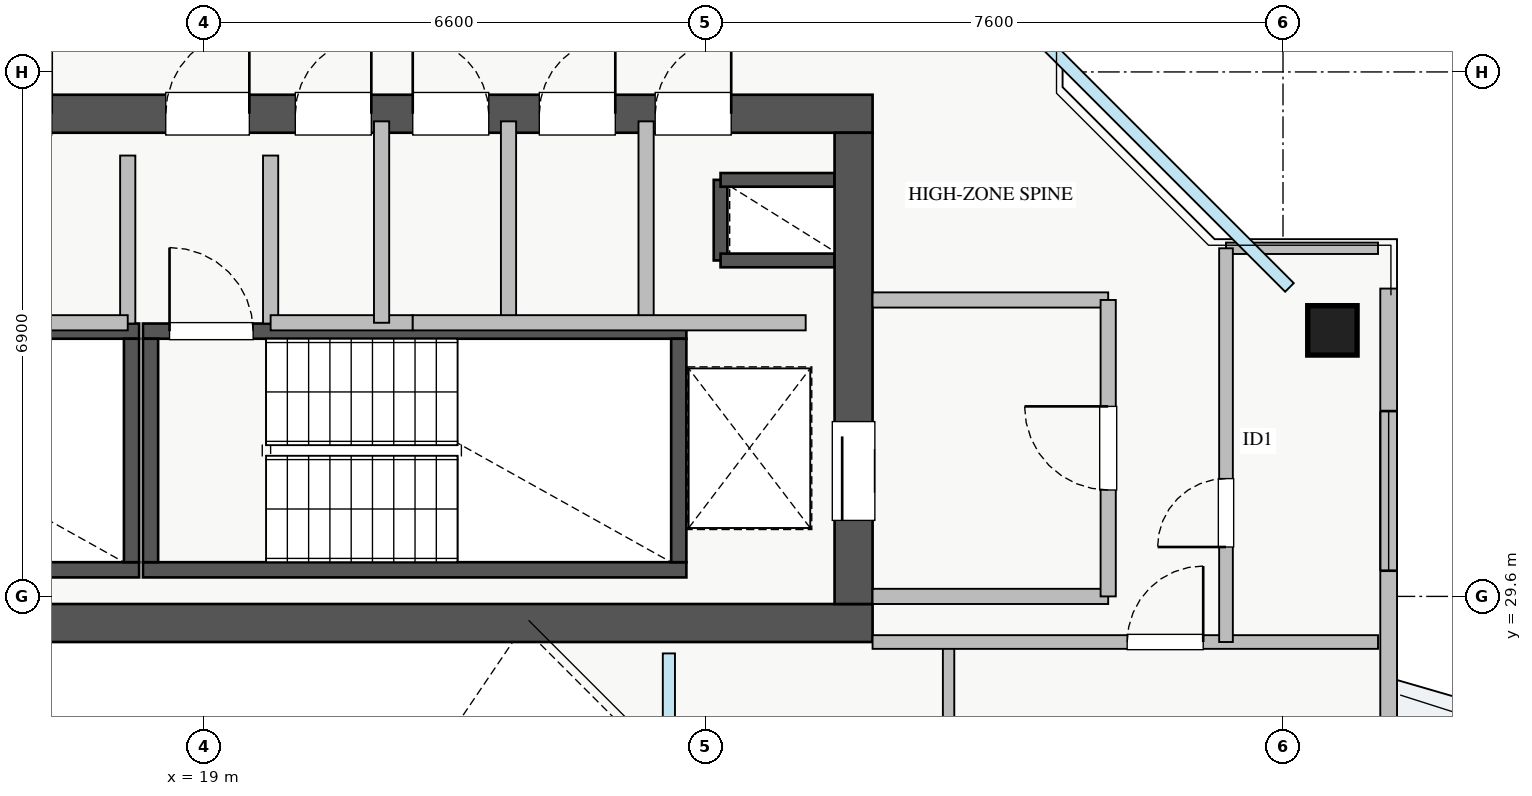
"""IFC4 building model, lengths in metres.
Left out: names, types, materials, properties, quantities, classifications, styles, units other than length and angle.
Written with IfcOpenShell. Run it as: python <this file> out.ifc"""

import sys

from ifc_helpers import new_model, si_unit, direction, frame, frame_2d, origin, origin_2d, place, context, subcontext, project, spatial, rectangle, extrude, source, transform, mapped, element, fill, save


model = new_model("IFC4")
c1 = context("Model", 3, precision=1e-05, world=origin(), true_north=direction((0.0, 1.0)))
c2 = subcontext(c1, "Body", "Model", "MODEL_VIEW")
j1 = project(units=[si_unit("LENGTHUNIT", "METRE"), si_unit("PLANEANGLEUNIT", "RADIAN")], contexts=[c1])
p1 = place(None, origin())
s1 = spatial("IfcSite", under=j1, at=p1, CompositionType="ELEMENT")
p2 = place(p1, origin())
s2 = spatial("IfcBuilding", under=s1, at=p2, CompositionType="ELEMENT")
p3 = place(p2, frame((0.0, 0.0, 243.75)))
s3 = spatial("IfcBuildingStorey", under=s2, at=p3, CompositionType="ELEMENT", Elevation=243.75)
p4 = place(p3, frame((25.8, 34.02, 0.0), z_axis=(0.0, 0.0, 1.0), x_axis=(0.0, 1.0, 0.0)))
e1 = element("IfcWall", 1, at=p4, inside=s3, PredefinedType="SHEAR", context=c2, shape_type="SweptSolid", body=[
    extrude(rectangle(XDim=1.06, YDim=0.18, at=frame_2d((0.53, 0.0))), origin(), (0.0, 0.0, 1.0), 3.07),
])
for number, where, z_axis, x_axis in (
    (2, (25.8, 35.08, 0.0), (0.0, 0.0, 1.0), (1.0, 0.0, 0.0)),
    (3, (25.8, 34.02, 0.0), (0.0, 0.0, 1.0), (1.0, 0.0, 0.0)),
):
    element("IfcWall", number, at=place(p3, frame(where, z_axis=z_axis, x_axis=x_axis)), inside=s3, PredefinedType="SHEAR", context=c2, shape_type="SweptSolid", body=[
        extrude(rectangle(XDim=1.5, YDim=0.18, at=frame_2d((0.75, 0.0))), origin(), (0.0, 0.0, 1.0), 3.07),
    ])
p5 = place(p3, frame((10.7, 29.95, 0.0), z_axis=(0.0, 0.0, 1.0), x_axis=(1.0, 0.0, 0.0)))
e4 = element("IfcWall", 4, at=p5, inside=s3, PredefinedType="SHEAR", context=c2, shape_type="SweptSolid", body=[
    extrude(rectangle(XDim=7.45, YDim=0.2, at=frame_2d((3.725, 0.0))), origin(), (0.0, 0.0, 1.0), 3.25),
])
p6 = place(p3, frame((10.7, 33.09, 0.0), z_axis=(0.0, 0.0, 1.0), x_axis=(1.0, 0.0, 0.0)))
e5 = element("IfcWall", 5, at=p6, inside=s3, PredefinedType="SHEAR", context=c2, shape_type="SweptSolid", body=[
    extrude(rectangle(XDim=7.45, YDim=0.2, at=frame_2d((3.725, 0.0))), origin(), (0.0, 0.0, 1.0), 3.25),
])
p7 = place(p6, frame((0.35, 0.0, 0.0)))
e6 = element("IfcOpeningElement", 6, at=p7, cuts=e5, PredefinedType="OPENING", context=c2, shape_type="SweptSolid", body=[
    extrude(rectangle(XDim=1.1, YDim=2.05, at=frame_2d((0.55, 1.025))), frame((0.0, 0.11, 0.0), z_axis=(0.0, -1.0, 0.0), x_axis=(1.0, 0.0, 0.0)), (0.0, 0.0, 1.0), 0.22),
])
p8 = place(p3, frame((18.05, 30.05, 0.0), z_axis=(0.0, 0.0, 1.0), x_axis=(0.0, 1.0, 0.0)))
e7 = element("IfcWall", 7, at=p8, inside=s3, PredefinedType="SHEAR", context=c2, shape_type="SweptSolid", body=[
    extrude(rectangle(XDim=2.94, YDim=0.2, at=frame_2d((1.47, 0.0))), origin(), (0.0, 0.0, 1.0), 3.25),
])
p9 = place(p3, frame((18.2, 29.95, 0.0), z_axis=(0.0, 0.0, 1.0), x_axis=(1.0, 0.0, 0.0)))
e8 = element("IfcWall", 8, at=p9, inside=s3, PredefinedType="SHEAR", context=c2, shape_type="SweptSolid", body=[
    extrude(rectangle(XDim=7.15, YDim=0.2, at=frame_2d((3.575, 0.0))), origin(), (0.0, 0.0, 1.0), 3.25),
])
p10 = place(p3, frame((18.2, 33.09, 0.0), z_axis=(0.0, 0.0, 1.0), x_axis=(1.0, 0.0, 0.0)))
e9 = element("IfcWall", 9, at=p10, inside=s3, PredefinedType="SHEAR", context=c2, shape_type="SweptSolid", body=[
    extrude(rectangle(XDim=7.15, YDim=0.2, at=frame_2d((3.575, 0.0))), origin(), (0.0, 0.0, 1.0), 3.25),
])
p11 = place(p10, frame((0.35, 0.0, 0.0)))
e10 = element("IfcOpeningElement", 10, at=p11, cuts=e9, PredefinedType="OPENING", context=c2, shape_type="SweptSolid", body=[
    extrude(rectangle(XDim=1.1, YDim=2.05, at=frame_2d((0.55, 1.025))), frame((0.0, 0.11, 0.0), z_axis=(0.0, -1.0, 0.0), x_axis=(1.0, 0.0, 0.0)), (0.0, 0.0, 1.0), 0.22),
])
for number, where, z_axis, x_axis in (
    (11, (18.3, 30.05, 0.0), (0.0, 0.0, 1.0), (0.0, 1.0, 0.0)),
    (12, (25.25, 30.05, 0.0), (0.0, 0.0, 1.0), (0.0, 1.0, 0.0)),
):
    element("IfcWall", number, at=place(p3, frame(where, z_axis=z_axis, x_axis=x_axis)), inside=s3, PredefinedType="SHEAR", context=c2, shape_type="SweptSolid", body=[
        extrude(rectangle(XDim=2.94, YDim=0.2, at=frame_2d((1.47, 0.0))), origin(), (0.0, 0.0, 1.0), 3.25),
    ])
p12 = place(p3, frame((10.2, 29.25, 0.0), z_axis=(0.0, 0.0, 1.0), x_axis=(1.0, 0.0, 0.0)))
e13 = element("IfcWall", 13, at=p12, inside=s3, PredefinedType="SHEAR", context=c2, shape_type="SweptSolid", body=[
    extrude(rectangle(XDim=17.6, YDim=0.5, at=frame_2d((8.8, 0.0))), origin(), (0.0, 0.0, 1.0), 3.25),
])
p13 = place(p3, frame((10.2, 35.95, 0.0), z_axis=(0.0, 0.0, 1.0), x_axis=(1.0, 0.0, 0.0)))
e14 = element("IfcWall", 14, at=p13, inside=s3, PredefinedType="SHEAR", context=c2, shape_type="SweptSolid", body=[
    extrude(rectangle(XDim=17.6, YDim=0.5, at=frame_2d((8.8, 0.0))), origin(), (0.0, 0.0, 1.0), 3.25),
])
p14 = place(p13, frame((1.15, 0.0, 0.0)))
e15 = element("IfcOpeningElement", 15, at=p14, cuts=e14, PredefinedType="OPENING", context=c2, shape_type="SweptSolid", body=[
    extrude(rectangle(XDim=1.1, YDim=2.05, at=frame_2d((0.55, 1.025))), frame((0.0, 0.26, 0.0), z_axis=(0.0, -1.0, 0.0), x_axis=(1.0, 0.0, 0.0)), (0.0, 0.0, 1.0), 0.52),
])
p15 = place(p13, frame((8.3, 0.0, 0.0)))
e16 = element("IfcOpeningElement", 16, at=p15, cuts=e14, PredefinedType="OPENING", context=c2, shape_type="SweptSolid", body=[
    extrude(rectangle(XDim=1.1, YDim=2.05, at=frame_2d((0.55, 1.025))), frame((0.0, 0.26, 0.0), z_axis=(0.0, -1.0, 0.0), x_axis=(1.0, 0.0, 0.0)), (0.0, 0.0, 1.0), 0.52),
])
p16 = place(p13, frame((2.85, 0.0, 0.0)))
e17 = element("IfcOpeningElement", 17, at=p16, cuts=e14, PredefinedType="OPENING", context=c2, shape_type="SweptSolid", body=[
    extrude(rectangle(XDim=1.1, YDim=2.05, at=frame_2d((0.55, 1.025))), frame((0.0, 0.26, 0.0), z_axis=(0.0, -1.0, 0.0), x_axis=(1.0, 0.0, 0.0)), (0.0, 0.0, 1.0), 0.52),
])
p17 = place(p13, frame((5.8, 0.0, 0.0)))
e18 = element("IfcOpeningElement", 18, at=p17, cuts=e14, PredefinedType="OPENING", context=c2, shape_type="SweptSolid", body=[
    extrude(rectangle(XDim=1.0, YDim=2.05, at=frame_2d((0.5, 1.025))), frame((0.0, 0.26, 0.0), z_axis=(0.0, -1.0, 0.0), x_axis=(1.0, 0.0, 0.0)), (0.0, 0.0, 1.0), 0.52),
])
p18 = place(p13, frame((14.74, 0.0, 0.0)))
e19 = element("IfcOpeningElement", 19, at=p18, cuts=e14, PredefinedType="OPENING", context=c2, shape_type="SweptSolid", body=[
    extrude(rectangle(XDim=1.0, YDim=2.05, at=frame_2d((0.5, 1.025))), frame((0.0, 0.26, 0.0), z_axis=(0.0, -1.0, 0.0), x_axis=(1.0, 0.0, 0.0)), (0.0, 0.0, 1.0), 0.52),
])
p19 = place(p13, frame((10.005, 0.0, 0.0)))
e20 = element("IfcOpeningElement", 20, at=p19, cuts=e14, PredefinedType="OPENING", context=c2, shape_type="SweptSolid", body=[
    extrude(rectangle(XDim=1.0, YDim=2.05, at=frame_2d((0.5, 1.025))), frame((0.0, 0.26, 0.0), z_axis=(0.0, -1.0, 0.0), x_axis=(1.0, 0.0, 0.0)), (0.0, 0.0, 1.0), 0.52),
])
p20 = place(p13, frame((11.55, 0.0, 0.0)))
e21 = element("IfcOpeningElement", 21, at=p20, cuts=e14, PredefinedType="OPENING", context=c2, shape_type="SweptSolid", body=[
    extrude(rectangle(XDim=1.0, YDim=2.05, at=frame_2d((0.5, 1.025))), frame((0.0, 0.26, 0.0), z_axis=(0.0, -1.0, 0.0), x_axis=(1.0, 0.0, 0.0)), (0.0, 0.0, 1.0), 0.52),
])
p21 = place(p13, frame((13.215, 0.0, 0.0)))
e22 = element("IfcOpeningElement", 22, at=p21, cuts=e14, PredefinedType="OPENING", context=c2, shape_type="SweptSolid", body=[
    extrude(rectangle(XDim=1.0, YDim=2.05, at=frame_2d((0.5, 1.025))), frame((0.0, 0.26, 0.0), z_axis=(0.0, -1.0, 0.0), x_axis=(1.0, 0.0, 0.0)), (0.0, 0.0, 1.0), 0.52),
])
p22 = place(p3, frame((27.55, 29.5, 0.0), z_axis=(0.0, 0.0, 1.0), x_axis=(0.0, 1.0, 0.0)))
e23 = element("IfcWall", 23, at=p22, inside=s3, PredefinedType="SHEAR", context=c2, shape_type="SweptSolid", body=[
    extrude(rectangle(XDim=6.2, YDim=0.5, at=frame_2d((3.1, 0.0))), origin(), (0.0, 0.0, 1.0), 3.25),
])
p23 = place(p22, frame((1.1, 0.0, 0.0)))
e24 = element("IfcOpeningElement", 24, at=p23, cuts=e23, PredefinedType="OPENING", context=c2, shape_type="SweptSolid", body=[
    extrude(rectangle(XDim=1.3, YDim=2.05, at=frame_2d((0.65, 1.025))), frame((0.0, 0.26, 0.0), z_axis=(0.0, -1.0, 0.0), x_axis=(1.0, 0.0, 0.0)), (0.0, 0.0, 1.0), 0.52),
])
m1 = source(origin(), c2, "Body", "SweptSolid", [
    extrude(rectangle(XDim=0.65, YDim=0.65, at=origin_2d()), origin(), (0.0, 0.0, 1.0), 3.25),
])
p24 = place(p3, frame((33.85, 33.1, 0.0), z_axis=(0.0, 0.0, 1.0), x_axis=(1.0, 0.0, 0.0)))
e25 = element("IfcColumn", 25, at=p24, inside=s3, PredefinedType="COLUMN", context=c2, shape_type="MappedRepresentation", body=[
    mapped(m1, transform((0.0, 0.0, 0.0), x_axis=(1.0, 0.0, 0.0), y_axis=(0.0, 1.0, 0.0), z_axis=(0.0, 0.0, 1.0), scale=1.0)),
])
p25 = place(p3, frame((34.59, 12.35, 0.0), z_axis=(0.0, 0.0, 1.0), x_axis=(0.0, 1.0, 0.0)))
e26 = element("IfcWall", 26, at=p25, inside=s3, PredefinedType="STANDARD", context=c2, shape_type="SweptSolid", body=[
    extrude(rectangle(XDim=21.3, YDim=0.22, at=frame_2d((10.65, 0.0))), origin(), (0.0, 0.0, 1.0), 2.61),
])
p26 = place(p25, frame((11.5, 0.0, 0.0)))
e27 = element("IfcOpeningElement", 27, at=p26, cuts=e26, PredefinedType="OPENING", context=c2, shape_type="SweptSolid", body=[
    extrude(rectangle(XDim=1.2, YDim=2.1, at=frame_2d((0.6, 1.05))), frame((0.0, 0.12, 0.0), z_axis=(0.0, -1.0, 0.0), x_axis=(1.0, 0.0, 0.0)), (0.0, 0.0, 1.0), 0.24),
])
p27 = place(p25, frame((1.463, 0.0, 0.9)))
e28 = element("IfcOpeningElement", 28, at=p27, cuts=e26, PredefinedType="OPENING", context=c2, shape_type="SweptSolid", body=[
    extrude(rectangle(XDim=2.4, YDim=1.48, at=frame_2d((1.2, 0.74))), frame((0.0, 0.12, 0.0), z_axis=(0.0, -1.0, 0.0), x_axis=(1.0, 0.0, 0.0)), (0.0, 0.0, 1.0), 0.24),
])
p28 = place(p25, frame((17.588, 0.0, 0.9)))
e29 = element("IfcOpeningElement", 29, at=p28, cuts=e26, PredefinedType="OPENING", context=c2, shape_type="SweptSolid", body=[
    extrude(rectangle(XDim=2.1, YDim=1.48, at=frame_2d((1.05, 0.74))), frame((0.0, 0.12, 0.0), z_axis=(0.0, -1.0, 0.0), x_axis=(1.0, 0.0, 0.0)), (0.0, 0.0, 1.0), 0.24),
])
for number, where, z_axis, x_axis in (
    (30, (27.8, 29.6, 0.0), (0.0, 0.0, 1.0), (1.0, 0.0, 0.0)),
    (31, (27.8, 33.5, 0.0), (0.0, 0.0, 1.0), (1.0, 0.0, 0.0)),
):
    element("IfcWall", number, at=place(p3, frame(where, z_axis=z_axis, x_axis=x_axis)), inside=s3, PredefinedType="PARTITIONING", context=c2, shape_type="SweptSolid", body=[
        extrude(rectangle(XDim=3.1, YDim=0.2, at=frame_2d((1.55, 0.0))), origin(), (0.0, 0.0, 1.0), 3.07),
    ])
p29 = place(p3, frame((30.9, 29.6, 0.0), z_axis=(0.0, 0.0, 1.0), x_axis=(0.0, 1.0, 0.0)))
e32 = element("IfcWall", 32, at=p29, inside=s3, PredefinedType="PARTITIONING", context=c2, shape_type="SweptSolid", body=[
    extrude(rectangle(XDim=3.9, YDim=0.2, at=frame_2d((1.95, 0.0))), origin(), (0.0, 0.0, 1.0), 2.865),
])
p30 = place(p29, frame((1.4, 0.0, 0.0)))
e33 = element("IfcOpeningElement", 33, at=p30, cuts=e32, PredefinedType="OPENING", context=c2, shape_type="SweptSolid", body=[
    extrude(rectangle(XDim=1.1, YDim=2.05, at=frame_2d((0.55, 1.025))), frame((0.0, 0.11, 0.0), z_axis=(0.0, -1.0, 0.0), x_axis=(1.0, 0.0, 0.0)), (0.0, 0.0, 1.0), 0.22),
])
for number, where, z_axis, x_axis in (
    (34, (18.0, 33.19, 0.0), (0.0, 0.0, 1.0), (0.0, 1.0, 0.0)),
    (35, (19.88, 33.19, 0.0), (0.0, 0.0, 1.0), (0.0, 1.0, 0.0)),
):
    element("IfcWall", number, at=place(p3, frame(where, z_axis=z_axis, x_axis=x_axis)), inside=s3, PredefinedType="PARTITIONING", context=c2, shape_type="SweptSolid", body=[
        extrude(rectangle(XDim=2.21, YDim=0.2, at=frame_2d((1.105, 0.0))), origin(), (0.0, 0.0, 1.0), 3.07),
    ])
p31 = place(p3, frame((14.72, 33.2, 0.0), z_axis=(0.0, 0.0, 1.0), x_axis=(1.0, 0.0, 0.0)))
e36 = element("IfcWall", 36, at=p31, inside=s3, PredefinedType="PARTITIONING", context=c2, shape_type="SweptSolid", body=[
    extrude(rectangle(XDim=3.28, YDim=0.2, at=frame_2d((1.64, 0.0))), origin(), (0.0, 0.0, 1.0), 3.07),
])
p32 = place(p3, frame((24.82, 33.2, 0.0), z_axis=(0.0, 0.0, 1.0), x_axis=(0.0, 1.0, 0.0)))
e37 = element("IfcWall", 37, at=p32, inside=s3, PredefinedType="PARTITIONING", context=c2, shape_type="SweptSolid", body=[
    extrude(rectangle(XDim=2.65, YDim=0.2, at=frame_2d((1.325, 0.0))), origin(), (0.0, 0.0, 1.0), 3.07),
])
p33 = place(p3, frame((19.88, 33.2, 0.0), z_axis=(0.0, 0.0, 1.0), x_axis=(1.0, 0.0, 0.0)))
e38 = element("IfcWall", 38, at=p33, inside=s3, PredefinedType="PARTITIONING", context=c2, shape_type="SweptSolid", body=[
    extrude(rectangle(XDim=1.87, YDim=0.2, at=frame_2d((0.935, 0.0))), origin(), (0.0, 0.0, 1.0), 3.07),
])
for number, where, z_axis, x_axis in (
    (39, (21.34, 33.2, 0.0), (0.0, 0.0, 1.0), (0.0, 1.0, 0.0)),
    (40, (23.01, 33.2, 0.0), (0.0, 0.0, 1.0), (0.0, 1.0, 0.0)),
):
    element("IfcWall", number, at=place(p3, frame(where, z_axis=z_axis, x_axis=x_axis)), inside=s3, PredefinedType="PARTITIONING", context=c2, shape_type="SweptSolid", body=[
        extrude(rectangle(XDim=2.65, YDim=0.2, at=frame_2d((1.325, 0.0))), origin(), (0.0, 0.0, 1.0), 3.07),
    ])
p34 = place(p3, frame((21.75, 33.2, 0.0), z_axis=(0.0, 0.0, 1.0), x_axis=(1.0, 0.0, 0.0)))
e41 = element("IfcWall", 41, at=p34, inside=s3, PredefinedType="PARTITIONING", context=c2, shape_type="SweptSolid", body=[
    extrude(rectangle(XDim=5.17, YDim=0.2, at=frame_2d((2.585, 0.0))), origin(), (0.0, 0.0, 1.0), 3.07),
])
p35 = place(p3, frame((28.8, 23.0, 0.0), z_axis=(0.0, 0.0, 1.0), x_axis=(0.0, 1.0, 0.0)))
e42 = element("IfcWall", 42, at=p35, inside=s3, PredefinedType="PARTITIONING", context=c2, shape_type="SweptSolid", body=[
    extrude(rectangle(XDim=6.0, YDim=0.15, at=frame_2d((3.0, 0.0))), origin(), (0.0, 0.0, 1.0), 3.07),
])
p36 = place(p35, frame((2.2, 0.0, 0.0)))
e43 = element("IfcOpeningElement", 43, at=p36, cuts=e42, PredefinedType="OPENING", context=c2, shape_type="SweptSolid", body=[
    extrude(rectangle(XDim=0.9, YDim=2.05, at=frame_2d((0.45, 1.025))), frame((0.0, 0.085, 0.0), z_axis=(0.0, -1.0, 0.0), x_axis=(1.0, 0.0, 0.0)), (0.0, 0.0, 1.0), 0.17),
])
p37 = place(p3, frame((27.8, 29.0, 0.0), z_axis=(0.0, 0.0, 1.0), x_axis=(1.0, 0.0, 0.0)))
e44 = element("IfcWall", 44, at=p37, inside=s3, PredefinedType="PARTITIONING", context=c2, shape_type="SweptSolid", body=[
    extrude(rectangle(XDim=6.65, YDim=0.18, at=frame_2d((3.325, 0.0))), origin(), (0.0, 0.0, 1.0), 3.07),
])
p38 = place(p37, frame((3.35, 0.0, 0.0)))
e45 = element("IfcOpeningElement", 45, at=p38, cuts=e44, PredefinedType="OPENING", context=c2, shape_type="SweptSolid", body=[
    extrude(rectangle(XDim=1.0, YDim=2.05, at=frame_2d((0.5, 1.025))), frame((0.0, 0.1, 0.0), z_axis=(0.0, -1.0, 0.0), x_axis=(1.0, 0.0, 0.0)), (0.0, 0.0, 1.0), 0.2),
])
p39 = place(p3, frame((32.45, 34.18, 0.0), z_axis=(0.0, 0.0, 1.0), x_axis=(1.0, 0.0, 0.0)))
e46 = element("IfcWall", 46, at=p39, inside=s3, PredefinedType="PARTITIONING", context=c2, shape_type="SweptSolid", body=[
    extrude(rectangle(XDim=2.0, YDim=0.15, at=frame_2d((1.0, 0.0))), origin(), (0.0, 0.0, 1.0), 3.07),
])
p40 = place(p3, frame((32.45, 29.0, 0.0), z_axis=(0.0, 0.0, 1.0), x_axis=(0.0, 1.0, 0.0)))
e47 = element("IfcWall", 47, at=p40, inside=s3, PredefinedType="PARTITIONING", context=c2, shape_type="SweptSolid", body=[
    extrude(rectangle(XDim=5.18, YDim=0.18, at=frame_2d((2.59, 0.0))), origin(), (0.0, 0.0, 1.0), 3.07),
])
p41 = place(p40, frame((1.25, 0.0, 0.0)))
e48 = element("IfcOpeningElement", 48, at=p41, cuts=e47, PredefinedType="OPENING", context=c2, shape_type="SweptSolid", body=[
    extrude(rectangle(XDim=0.9, YDim=2.05, at=frame_2d((0.45, 1.025))), frame((0.0, 0.1, 0.0), z_axis=(0.0, -1.0, 0.0), x_axis=(1.0, 0.0, 0.0)), (0.0, 0.0, 1.0), 0.2),
])
m2 = source(origin(), c2, "Body", "SweptSolid", [
    extrude(rectangle(XDim=2.1, YDim=1.48, at=frame_2d((1.05, 0.74))), frame((0.0, 0.03, 0.0), z_axis=(0.0, -1.0, 0.0), x_axis=(1.0, 0.0, 0.0)), (0.0, 0.0, 1.0), 0.06),
])
p42 = place(p28, origin())
e49 = element("IfcWindow", 49, at=p42, inside=s3, PartitioningType="TRIPLE_PANEL_VERTICAL", PredefinedType="WINDOW", context=c2, shape_type="MappedRepresentation", body=[
    mapped(m2, transform((0.0, 0.0, 0.0), x_axis=(1.0, 0.0, 0.0), y_axis=(0.0, 1.0, 0.0), z_axis=(0.0, 0.0, 1.0), scale=1.0)),
])
fill(e29, e49)
m3 = source(origin(), c2, "Body", "SweptSolid", [
    extrude(rectangle(XDim=1.3, YDim=2.05, at=frame_2d((0.65, 1.025))), frame((0.0, 0.025, 0.0), z_axis=(0.0, -1.0, 0.0), x_axis=(1.0, 0.0, 0.0)), (0.0, 0.0, 1.0), 0.05),
])
p43 = place(p23, origin())
e50 = element("IfcDoor", 50, at=p43, inside=s3, OperationType="SLIDING_TO_LEFT", PredefinedType="DOOR", context=c2, shape_type="MappedRepresentation", body=[
    mapped(m3, transform((0.0, 0.0, 0.0), x_axis=(1.0, 0.0, 0.0), y_axis=(0.0, 1.0, 0.0), z_axis=(0.0, 0.0, 1.0), scale=1.0)),
])
fill(e24, e50)
m4 = source(origin(), c2, "Body", "SweptSolid", [
    extrude(rectangle(XDim=1.1, YDim=2.05, at=frame_2d((0.55, 1.025))), frame((0.0, 0.025, 0.0), z_axis=(0.0, -1.0, 0.0), x_axis=(1.0, 0.0, 0.0)), (0.0, 0.0, 1.0), 0.05),
])
p44 = place(p15, origin())
e51 = element("IfcDoor", 51, at=p44, inside=s3, OperationType="SINGLE_SWING_RIGHT", PredefinedType="DOOR", context=c2, shape_type="MappedRepresentation", body=[
    mapped(m4, transform((0.0, 0.0, 0.0), x_axis=(1.0, 0.0, 0.0), y_axis=(0.0, 1.0, 0.0), z_axis=(0.0, 0.0, 1.0), scale=1.0)),
])
fill(e16, e51)
p45 = place(p11, origin())
e52 = element("IfcDoor", 52, at=p45, inside=s3, OperationType="SINGLE_SWING_LEFT", PredefinedType="DOOR", context=c2, shape_type="MappedRepresentation", body=[
    mapped(m4, transform((0.0, 0.0, 0.0), x_axis=(1.0, 0.0, 0.0), y_axis=(0.0, 1.0, 0.0), z_axis=(0.0, 0.0, 1.0), scale=1.0)),
])
fill(e10, e52)
m5 = source(origin(), c2, "Body", "SweptSolid", [
    extrude(rectangle(XDim=1.0, YDim=2.05, at=frame_2d((0.5, 1.025))), frame((0.0, 0.025, 0.0), z_axis=(0.0, -1.0, 0.0), x_axis=(1.0, 0.0, 0.0)), (0.0, 0.0, 1.0), 0.05),
])
p46 = place(p18, origin())
e53 = element("IfcDoor", 53, at=p46, inside=s3, OperationType="SINGLE_SWING_RIGHT", PredefinedType="DOOR", context=c2, shape_type="MappedRepresentation", body=[
    mapped(m5, transform((0.0, 0.0, 0.0), x_axis=(1.0, 0.0, 0.0), y_axis=(0.0, 1.0, 0.0), z_axis=(0.0, 0.0, 1.0), scale=1.0)),
])
fill(e19, e53)
p47 = place(p19, origin())
e54 = element("IfcDoor", 54, at=p47, inside=s3, OperationType="SINGLE_SWING_RIGHT", PredefinedType="DOOR", context=c2, shape_type="MappedRepresentation", body=[
    mapped(m5, transform((0.0, 0.0, 0.0), x_axis=(1.0, 0.0, 0.0), y_axis=(0.0, 1.0, 0.0), z_axis=(0.0, 0.0, 1.0), scale=1.0)),
])
fill(e20, e54)
p48 = place(p20, origin())
e55 = element("IfcDoor", 55, at=p48, inside=s3, OperationType="SINGLE_SWING_LEFT", PredefinedType="DOOR", context=c2, shape_type="MappedRepresentation", body=[
    mapped(m5, transform((0.0, 0.0, 0.0), x_axis=(1.0, 0.0, 0.0), y_axis=(0.0, 1.0, 0.0), z_axis=(0.0, 0.0, 1.0), scale=1.0)),
])
fill(e21, e55)
p49 = place(p21, origin())
e56 = element("IfcDoor", 56, at=p49, inside=s3, OperationType="SINGLE_SWING_RIGHT", PredefinedType="DOOR", context=c2, shape_type="MappedRepresentation", body=[
    mapped(m5, transform((0.0, 0.0, 0.0), x_axis=(1.0, 0.0, 0.0), y_axis=(0.0, 1.0, 0.0), z_axis=(0.0, 0.0, 1.0), scale=1.0)),
])
fill(e22, e56)
p50 = place(p30, origin())
e57 = element("IfcDoor", 57, at=p50, inside=s3, OperationType="SINGLE_SWING_RIGHT", PredefinedType="DOOR", context=c2, shape_type="MappedRepresentation", body=[
    mapped(m4, transform((0.0, 0.0, 0.0), x_axis=(1.0, 0.0, 0.0), y_axis=(0.0, 1.0, 0.0), z_axis=(0.0, 0.0, 1.0), scale=1.0)),
])
fill(e33, e57)
p51 = place(p38, origin())
e58 = element("IfcDoor", 58, at=p51, inside=s3, OperationType="SINGLE_SWING_RIGHT", PredefinedType="DOOR", context=c2, shape_type="MappedRepresentation", body=[
    mapped(m5, transform((0.0, 0.0, 0.0), x_axis=(1.0, 0.0, 0.0), y_axis=(0.0, 1.0, 0.0), z_axis=(0.0, 0.0, 1.0), scale=1.0)),
])
fill(e45, e58)
m6 = source(origin(), c2, "Body", "SweptSolid", [
    extrude(rectangle(XDim=0.9, YDim=2.05, at=frame_2d((0.45, 1.025))), frame((0.0, 0.025, 0.0), z_axis=(0.0, -1.0, 0.0), x_axis=(1.0, 0.0, 0.0)), (0.0, 0.0, 1.0), 0.05),
])
p52 = place(p41, origin())
e59 = element("IfcDoor", 59, at=p52, inside=s3, OperationType="SINGLE_SWING_LEFT", PredefinedType="DOOR", context=c2, shape_type="MappedRepresentation", body=[
    mapped(m6, transform((0.0, 0.0, 0.0), x_axis=(1.0, 0.0, 0.0), y_axis=(0.0, 1.0, 0.0), z_axis=(0.0, 0.0, 1.0), scale=1.0)),
])
fill(e48, e59)
save(model, sys.argv[1])
